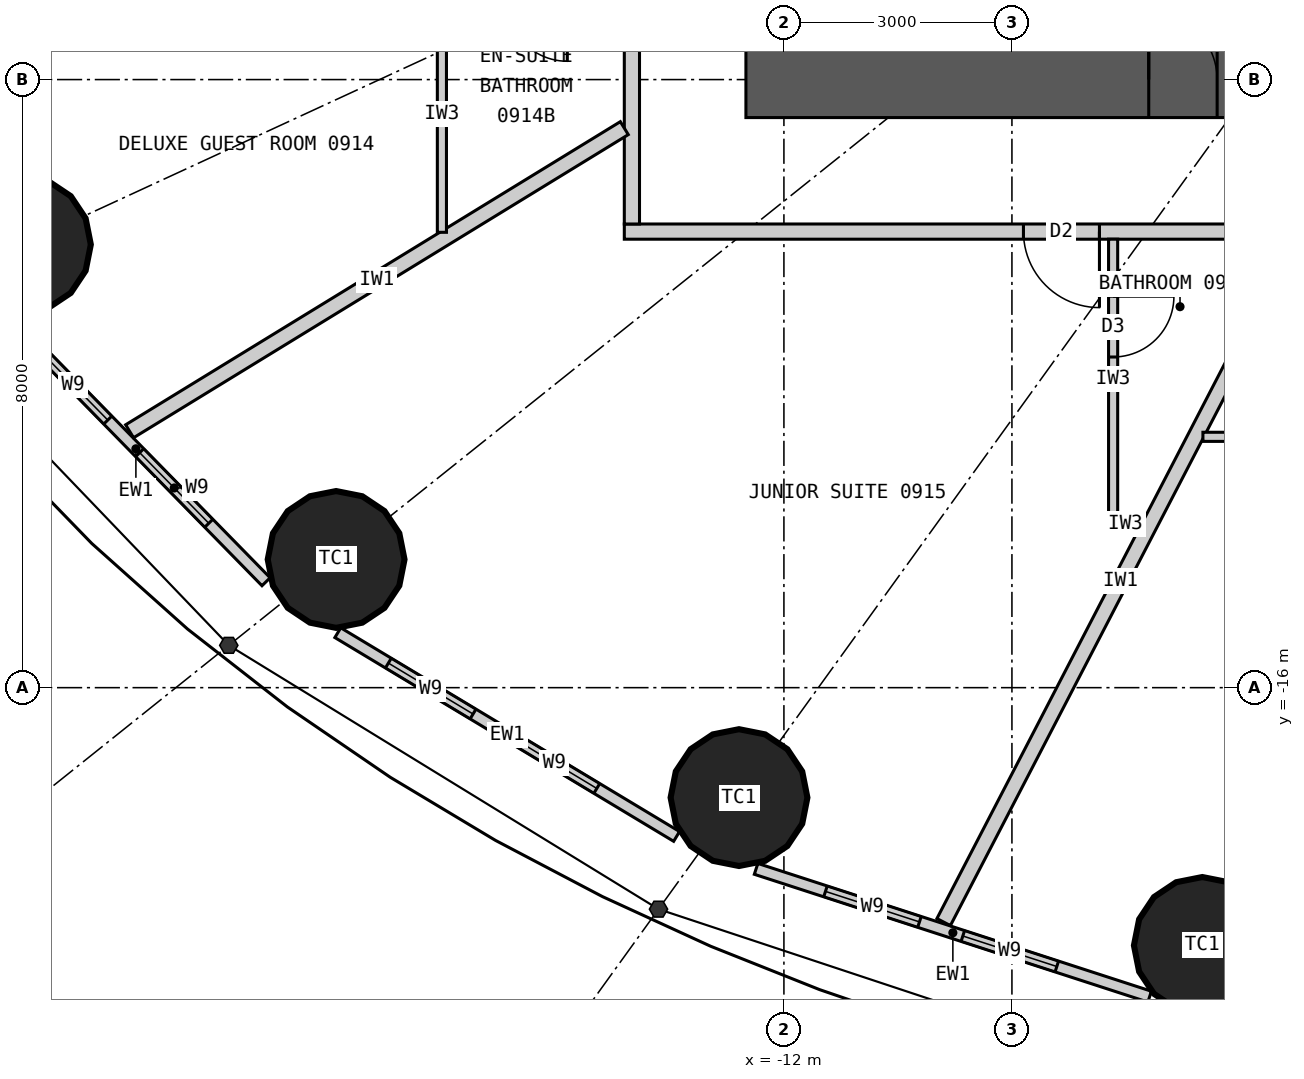
"""IFC4 building model, lengths in metres.
Left out: names, types, materials, properties, quantities, classifications, styles, units other than length and angle.
Written with IfcOpenShell. Run it as: python <this file> out.ifc"""

import sys

from ifc_helpers import new_model, si_unit, direction, frame, frame_2d, origin, origin_2d, place, context, subcontext, project, spatial, rectangle, circle, extrude, element, fill, save


model = new_model("IFC4")
c1 = context("Model", 3, precision=1e-05, world=origin(), true_north=direction((0.0, 1.0)))
c2 = subcontext(c1, "Body", "Model", "MODEL_VIEW")
j1 = project(units=[si_unit("LENGTHUNIT", "METRE"), si_unit("PLANEANGLEUNIT", "RADIAN")], contexts=[c1])
p1 = place(None, origin())
s1 = spatial("IfcSite", under=j1, at=p1, CompositionType="ELEMENT")
p2 = place(p1, origin())
s2 = spatial("IfcBuilding", under=s1, at=p2, CompositionType="ELEMENT")
p3 = place(p2, frame((0.0, 0.0, 42.6)))
s3 = spatial("IfcBuildingStorey", under=s2, at=p3, CompositionType="ELEMENT", Elevation=42.6)
for number, where, z_axis, x_axis in (
    (1, (-22.019, -10.17, 0.0), (0.0, 0.0, 1.0), (1.0, 0.0, 0.0)),
    (2, (-17.892, -14.313, 0.0), (0.0, 0.0, 1.0), (1.0, 0.0, 0.0)),
    (3, (-12.591, -17.447, 0.0), (0.0, 0.0, 1.0), (1.0, 0.0, 0.0)),
    (4, (-6.495, -19.391, 0.0), (0.0, 0.0, 1.0), (1.0, 0.0, 0.0)),
):
    element("IfcColumn", number, at=place(p3, frame(where, z_axis=z_axis, x_axis=x_axis)), inside=s3, PredefinedType="COLUMN", context=c2, shape_type="SweptSolid", body=[
        extrude(circle(Radius=0.9, at=origin_2d()), origin(), (0.0, 0.0, 1.0), 3.3),
    ])
p4 = place(p3, frame((12.5, -8.0, 0.0), z_axis=(0.0, 0.0, 1.0), x_axis=(-1.0, 0.0, 0.0)))
e5 = element("IfcWall", 5, at=p4, inside=s3, PredefinedType="SHEAR", context=c2, shape_type="SweptSolid", body=[
    extrude(rectangle(XDim=25.0, YDim=1.0, at=frame_2d((12.5, 0.0))), origin(), (0.0, 0.0, 1.0), 3.3),
])
p5 = place(p4, frame((11.2, 0.0, 0.0)))
e6 = element("IfcOpeningElement", 6, at=p5, cuts=e5, PredefinedType="OPENING", context=c2, shape_type="SweptSolid", body=[
    extrude(rectangle(XDim=1.2, YDim=2.2, at=frame_2d((0.6, 1.1))), frame((0.0, 0.51, 0.0), z_axis=(0.0, -1.0, 0.0), x_axis=(1.0, 0.0, 0.0)), (0.0, 0.0, 1.0), 1.02),
])
p6 = place(p4, frame((18.8, 0.0, 0.0)))
e7 = element("IfcOpeningElement", 7, at=p6, cuts=e5, PredefinedType="OPENING", context=c2, shape_type="SweptSolid", body=[
    extrude(rectangle(XDim=0.9, YDim=2.2, at=frame_2d((0.45, 1.1))), frame((0.0, 0.51, 0.0), z_axis=(0.0, -1.0, 0.0), x_axis=(1.0, 0.0, 0.0)), (0.0, 0.0, 1.0), 1.02),
])
p7 = place(p3, frame((-22.239, -11.108, 0.0), z_axis=(0.0, 0.0, 1.0), x_axis=(0.699612594083, -0.714522370679, 0.0)))
e8 = element("IfcWall", 8, at=p7, inside=s3, PredefinedType="ELEMENTEDWALL", context=c2, shape_type="SweptSolid", body=[
    extrude(rectangle(XDim=4.896, YDim=0.15, at=frame_2d((2.448, 0.0))), origin(), (0.0, 0.0, 1.0), 3.05),
])
p8 = place(p7, frame((0.619, 0.0, 0.9)))
e9 = element("IfcOpeningElement", 9, at=p8, cuts=e8, PredefinedType="OPENING", context=c2, shape_type="SweptSolid", body=[
    extrude(rectangle(XDim=1.3, YDim=1.9, at=frame_2d((0.65, 0.95))), frame((0.0, 0.085, 0.0), z_axis=(0.0, -1.0, 0.0), x_axis=(1.0, 0.0, 0.0)), (0.0, 0.0, 1.0), 0.17),
])
p9 = place(p7, frame((2.519, 0.0, 0.9)))
e10 = element("IfcOpeningElement", 10, at=p9, cuts=e8, PredefinedType="OPENING", context=c2, shape_type="SweptSolid", body=[
    extrude(rectangle(XDim=1.3, YDim=1.9, at=frame_2d((0.65, 0.95))), frame((0.0, 0.085, 0.0), z_axis=(0.0, -1.0, 0.0), x_axis=(1.0, 0.0, 0.0)), (0.0, 0.0, 1.0), 0.17),
])
p10 = place(p3, frame((-17.869, -15.277, 0.0), z_axis=(0.0, 0.0, 1.0), x_axis=(0.856958191554, -0.515385931054, 0.0)))
e11 = element("IfcWall", 11, at=p10, inside=s3, PredefinedType="ELEMENTEDWALL", context=c2, shape_type="SweptSolid", body=[
    extrude(rectangle(XDim=5.201, YDim=0.15, at=frame_2d((2.601, 0.0))), origin(), (0.0, 0.0, 1.0), 3.05),
])
p11 = place(p10, frame((0.776, 0.0, 0.9)))
e12 = element("IfcOpeningElement", 12, at=p11, cuts=e11, PredefinedType="OPENING", context=c2, shape_type="SweptSolid", body=[
    extrude(rectangle(XDim=1.3, YDim=1.9, at=frame_2d((0.65, 0.95))), frame((0.0, 0.085, 0.0), z_axis=(0.0, -1.0, 0.0), x_axis=(1.0, 0.0, 0.0)), (0.0, 0.0, 1.0), 0.17),
])
p12 = place(p10, frame((2.676, 0.0, 0.9)))
e13 = element("IfcOpeningElement", 13, at=p12, cuts=e11, PredefinedType="OPENING", context=c2, shape_type="SweptSolid", body=[
    extrude(rectangle(XDim=1.3, YDim=1.9, at=frame_2d((0.65, 0.95))), frame((0.0, 0.085, 0.0), z_axis=(0.0, -1.0, 0.0), x_axis=(1.0, 0.0, 0.0)), (0.0, 0.0, 1.0), 0.17),
])
p13 = place(p3, frame((-12.366, -18.384, 0.0), z_axis=(0.0, 0.0, 1.0), x_axis=(0.951138486029, -0.308764603532, 0.0)))
e14 = element("IfcWall", 14, at=p13, inside=s3, PredefinedType="ELEMENTEDWALL", context=c2, shape_type="SweptSolid", body=[
    extrude(rectangle(XDim=5.444, YDim=0.15, at=frame_2d((2.722, 0.0))), origin(), (0.0, 0.0, 1.0), 3.05),
])
p14 = place(p13, frame((0.96, 0.0, 0.9)))
e15 = element("IfcOpeningElement", 15, at=p14, cuts=e14, PredefinedType="OPENING", context=c2, shape_type="SweptSolid", body=[
    extrude(rectangle(XDim=1.3, YDim=1.9, at=frame_2d((0.65, 0.95))), frame((0.0, 0.085, 0.0), z_axis=(0.0, -1.0, 0.0), x_axis=(1.0, 0.0, 0.0)), (0.0, 0.0, 1.0), 0.17),
])
p15 = place(p13, frame((2.86, 0.0, 0.9)))
e16 = element("IfcOpeningElement", 16, at=p15, cuts=e14, PredefinedType="OPENING", context=c2, shape_type="SweptSolid", body=[
    extrude(rectangle(XDim=1.3, YDim=1.9, at=frame_2d((0.65, 0.95))), frame((0.0, 0.085, 0.0), z_axis=(0.0, -1.0, 0.0), x_axis=(1.0, 0.0, 0.0)), (0.0, 0.0, 1.0), 0.17),
])
p16 = place(p3, frame((14.1, -10.0, 0.0), z_axis=(0.0, 0.0, 1.0), x_axis=(-1.0, 0.0, 0.0)))
e17 = element("IfcWall", 17, at=p16, inside=s3, PredefinedType="PARTITIONING", context=c2, shape_type="SweptSolid", body=[
    extrude(rectangle(XDim=28.2, YDim=0.2, at=frame_2d((14.1, 0.0))), origin(), (0.0, 0.0, 1.0), 3.05),
])
p17 = place(p16, frame((21.948, 0.0, 0.0)))
e18 = element("IfcOpeningElement", 18, at=p17, cuts=e17, PredefinedType="OPENING", context=c2, shape_type="SweptSolid", body=[
    extrude(rectangle(XDim=1.0, YDim=2.2, at=frame_2d((0.5, 1.1))), frame((0.0, 0.11, 0.0), z_axis=(0.0, -1.0, 0.0), x_axis=(1.0, 0.0, 0.0)), (0.0, 0.0, 1.0), 0.22),
])
p18 = place(p16, frame((15.684, 0.0, 0.0)))
e19 = element("IfcOpeningElement", 19, at=p18, cuts=e17, PredefinedType="OPENING", context=c2, shape_type="SweptSolid", body=[
    extrude(rectangle(XDim=1.0, YDim=2.2, at=frame_2d((0.5, 1.1))), frame((0.0, 0.11, 0.0), z_axis=(0.0, -1.0, 0.0), x_axis=(1.0, 0.0, 0.0)), (0.0, 0.0, 1.0), 0.22),
])
p19 = place(p16, frame((8.875, 0.0, 0.0)))
e20 = element("IfcOpeningElement", 20, at=p19, cuts=e17, PredefinedType="OPENING", context=c2, shape_type="SweptSolid", body=[
    extrude(rectangle(XDim=1.0, YDim=2.2, at=frame_2d((0.5, 1.1))), frame((0.0, 0.11, 0.0), z_axis=(0.0, -1.0, 0.0), x_axis=(1.0, 0.0, 0.0)), (0.0, 0.0, 1.0), 0.22),
])
p20 = place(p3, frame((-14.0, 9.9, 0.0), z_axis=(0.0, 0.0, 1.0), x_axis=(0.0, -1.0, 0.0)))
e21 = element("IfcWall", 21, at=p20, inside=s3, PredefinedType="PARTITIONING", context=c2, shape_type="SweptSolid", body=[
    extrude(rectangle(XDim=19.8, YDim=0.2, at=frame_2d((9.9, 0.0))), origin(), (0.0, 0.0, 1.0), 3.05),
])
p21 = place(p20, frame((0.103, 0.0, 0.0)))
e22 = element("IfcOpeningElement", 22, at=p21, cuts=e21, PredefinedType="OPENING", context=c2, shape_type="SweptSolid", body=[
    extrude(rectangle(XDim=1.0, YDim=2.2, at=frame_2d((0.5, 1.1))), frame((0.0, 0.11, 0.0), z_axis=(0.0, -1.0, 0.0), x_axis=(1.0, 0.0, 0.0)), (0.0, 0.0, 1.0), 0.22),
])
p22 = place(p20, frame((5.252, 0.0, 0.0)))
e23 = element("IfcOpeningElement", 23, at=p22, cuts=e21, PredefinedType="OPENING", context=c2, shape_type="SweptSolid", body=[
    extrude(rectangle(XDim=1.0, YDim=2.0, at=frame_2d((0.5, 1.0))), frame((0.0, 0.11, 0.0), z_axis=(0.0, -1.0, 0.0), x_axis=(1.0, 0.0, 0.0)), (0.0, 0.0, 1.0), 0.22),
])
p23 = place(p20, frame((10.117, 0.0, 0.0)))
e24 = element("IfcOpeningElement", 24, at=p23, cuts=e21, PredefinedType="OPENING", context=c2, shape_type="SweptSolid", body=[
    extrude(rectangle(XDim=1.0, YDim=2.2, at=frame_2d((0.5, 1.1))), frame((0.0, 0.11, 0.0), z_axis=(0.0, -1.0, 0.0), x_axis=(1.0, 0.0, 0.0)), (0.0, 0.0, 1.0), 0.22),
])
p24 = place(p20, frame((13.247, 0.0, 0.0)))
e25 = element("IfcOpeningElement", 25, at=p24, cuts=e21, PredefinedType="OPENING", context=c2, shape_type="SweptSolid", body=[
    extrude(rectangle(XDim=1.0, YDim=2.0, at=frame_2d((0.5, 1.0))), frame((0.0, 0.11, 0.0), z_axis=(0.0, -1.0, 0.0), x_axis=(1.0, 0.0, 0.0)), (0.0, 0.0, 1.0), 0.22),
])
p25 = place(p20, frame((15.679, 0.0, 0.0)))
e26 = element("IfcOpeningElement", 26, at=p25, cuts=e21, PredefinedType="OPENING", context=c2, shape_type="SweptSolid", body=[
    extrude(rectangle(XDim=1.0, YDim=2.2, at=frame_2d((0.5, 1.1))), frame((0.0, 0.11, 0.0), z_axis=(0.0, -1.0, 0.0), x_axis=(1.0, 0.0, 0.0)), (0.0, 0.0, 1.0), 0.22),
])
p26 = place(p3, frame((-14.1, -4.663, 0.0), z_axis=(0.0, 0.0, 1.0), x_axis=(-0.949432655039, -0.31397075269, 0.0)))
e27 = element("IfcWall", 27, at=p26, inside=s3, PredefinedType="PARTITIONING", context=c2, shape_type="SweptSolid", body=[
    extrude(rectangle(XDim=10.486, YDim=0.2, at=frame_2d((5.243, 0.0))), origin(), (0.0, 0.0, 1.0), 3.05),
])
p27 = place(p3, frame((-14.1, -8.639, 0.0), z_axis=(0.0, 0.0, 1.0), x_axis=(-0.852672493023, -0.522445805459, 0.0)))
e28 = element("IfcWall", 28, at=p27, inside=s3, PredefinedType="PARTITIONING", context=c2, shape_type="SweptSolid", body=[
    extrude(rectangle(XDim=7.633, YDim=0.2, at=frame_2d((3.817, 0.0))), origin(), (0.0, 0.0, 1.0), 3.05),
])
p28 = place(p3, frame((-5.239, -10.1, 0.0), z_axis=(0.0, 0.0, 1.0), x_axis=(-0.460422783389, -0.887699758103, 0.0)))
e29 = element("IfcWall", 29, at=p28, inside=s3, PredefinedType="PARTITIONING", context=c2, shape_type="SweptSolid", body=[
    extrude(rectangle(XDim=10.12, YDim=0.2, at=frame_2d((5.06, 0.0))), origin(), (0.0, 0.0, 1.0), 3.05),
])
p29 = place(p3, frame((-16.5, -10.01, 0.0), z_axis=(0.0, 0.0, 1.0), x_axis=(0.0, 1.0, 0.0)))
e30 = element("IfcWall", 30, at=p29, inside=s3, PredefinedType="PARTITIONING", context=c2, shape_type="SweptSolid", body=[
    extrude(rectangle(XDim=3.111, YDim=0.12, at=frame_2d((1.555, 0.0))), origin(), (0.0, 0.0, 1.0), 3.05),
])
p30 = place(p3, frame((-7.284, -13.85, 0.0), z_axis=(0.0, 0.0, 1.0), x_axis=(-1.0, 0.0, 0.0)))
e31 = element("IfcWall", 31, at=p30, inside=s3, PredefinedType="PARTITIONING", context=c2, shape_type="SweptSolid", body=[
    extrude(rectangle(XDim=0.445, YDim=0.12, at=frame_2d((0.222, 0.0))), origin(), (0.0, 0.0, 1.0), 3.05),
])
p31 = place(p3, frame((-7.669, -10.1, 0.0), z_axis=(0.0, 0.0, 1.0), x_axis=(0.0, -1.0, 0.0)))
e32 = element("IfcWall", 32, at=p31, inside=s3, PredefinedType="PARTITIONING", context=c2, shape_type="SweptSolid", body=[
    extrude(rectangle(XDim=3.69, YDim=0.12, at=frame_2d((1.845, 0.0))), origin(), (0.0, 0.0, 1.0), 3.05),
])
p32 = place(p31, frame((0.75, 0.0, 0.0)))
e33 = element("IfcOpeningElement", 33, at=p32, cuts=e32, PredefinedType="OPENING", context=c2, shape_type="SweptSolid", body=[
    extrude(rectangle(XDim=0.8, YDim=2.1, at=frame_2d((0.4, 1.05))), frame((0.0, 0.07, 0.0), z_axis=(0.0, -1.0, 0.0), x_axis=(1.0, 0.0, 0.0)), (0.0, 0.0, 1.0), 0.14),
])
p33 = place(p3, frame((-6.487, -12.7, 0.0), z_axis=(0.0, 0.0, 1.0), x_axis=(1.0, 0.0, 0.0)))
e34 = element("IfcWall", 34, at=p33, inside=s3, PredefinedType="PARTITIONING", context=c2, shape_type="SweptSolid", body=[
    extrude(rectangle(XDim=3.688, YDim=0.12, at=frame_2d((1.844, 0.0))), origin(), (0.0, 0.0, 1.0), 3.05),
])
p34 = place(p8, origin())
e35 = element("IfcWindow", 35, at=p34, inside=s3, PartitioningType="SINGLE_PANEL", PredefinedType="WINDOW", context=c2, shape_type="SweptSolid", body=[
    extrude(rectangle(XDim=1.3, YDim=1.9, at=frame_2d((0.65, 0.95))), frame((0.0, 0.03, 0.0), z_axis=(0.0, -1.0, 0.0), x_axis=(1.0, 0.0, 0.0)), (0.0, 0.0, 1.0), 0.06),
])
fill(e9, e35)
p35 = place(p9, origin())
e36 = element("IfcWindow", 36, at=p35, inside=s3, PartitioningType="SINGLE_PANEL", PredefinedType="WINDOW", context=c2, shape_type="SweptSolid", body=[
    extrude(rectangle(XDim=1.3, YDim=1.9, at=frame_2d((0.65, 0.95))), frame((0.0, 0.03, 0.0), z_axis=(0.0, -1.0, 0.0), x_axis=(1.0, 0.0, 0.0)), (0.0, 0.0, 1.0), 0.06),
])
fill(e10, e36)
p36 = place(p11, origin())
e37 = element("IfcWindow", 37, at=p36, inside=s3, PartitioningType="SINGLE_PANEL", PredefinedType="WINDOW", context=c2, shape_type="SweptSolid", body=[
    extrude(rectangle(XDim=1.3, YDim=1.9, at=frame_2d((0.65, 0.95))), frame((0.0, 0.03, 0.0), z_axis=(0.0, -1.0, 0.0), x_axis=(1.0, 0.0, 0.0)), (0.0, 0.0, 1.0), 0.06),
])
fill(e12, e37)
p37 = place(p12, origin())
e38 = element("IfcWindow", 38, at=p37, inside=s3, PartitioningType="SINGLE_PANEL", PredefinedType="WINDOW", context=c2, shape_type="SweptSolid", body=[
    extrude(rectangle(XDim=1.3, YDim=1.9, at=frame_2d((0.65, 0.95))), frame((0.0, 0.03, 0.0), z_axis=(0.0, -1.0, 0.0), x_axis=(1.0, 0.0, 0.0)), (0.0, 0.0, 1.0), 0.06),
])
fill(e13, e38)
p38 = place(p14, origin())
e39 = element("IfcWindow", 39, at=p38, inside=s3, PartitioningType="SINGLE_PANEL", PredefinedType="WINDOW", context=c2, shape_type="SweptSolid", body=[
    extrude(rectangle(XDim=1.3, YDim=1.9, at=frame_2d((0.65, 0.95))), frame((0.0, 0.03, 0.0), z_axis=(0.0, -1.0, 0.0), x_axis=(1.0, 0.0, 0.0)), (0.0, 0.0, 1.0), 0.06),
])
fill(e15, e39)
p39 = place(p15, origin())
e40 = element("IfcWindow", 40, at=p39, inside=s3, PartitioningType="SINGLE_PANEL", PredefinedType="WINDOW", context=c2, shape_type="SweptSolid", body=[
    extrude(rectangle(XDim=1.3, YDim=1.9, at=frame_2d((0.65, 0.95))), frame((0.0, 0.03, 0.0), z_axis=(0.0, -1.0, 0.0), x_axis=(1.0, 0.0, 0.0)), (0.0, 0.0, 1.0), 0.06),
])
fill(e16, e40)
p40 = place(p32, origin())
e41 = element("IfcDoor", 41, at=p40, inside=s3, OperationType="SINGLE_SWING_LEFT", PredefinedType="DOOR", context=c2, shape_type="SweptSolid", body=[
    extrude(rectangle(XDim=0.8, YDim=2.1, at=frame_2d((0.4, 1.05))), frame((0.0, 0.025, 0.0), z_axis=(0.0, -1.0, 0.0), x_axis=(1.0, 0.0, 0.0)), (0.0, 0.0, 1.0), 0.05),
])
fill(e33, e41)
p41 = place(p17, origin())
e42 = element("IfcDoor", 42, at=p41, inside=s3, OperationType="SINGLE_SWING_LEFT", PredefinedType="DOOR", context=c2, shape_type="SweptSolid", body=[
    extrude(rectangle(XDim=1.0, YDim=2.2, at=frame_2d((0.5, 1.1))), frame((0.0, 0.025, 0.0), z_axis=(0.0, -1.0, 0.0), x_axis=(1.0, 0.0, 0.0)), (0.0, 0.0, 1.0), 0.05),
])
fill(e18, e42)
p42 = place(p6, origin())
e43 = element("IfcDoor", 43, at=p42, inside=s3, OperationType="SINGLE_SWING_RIGHT", PredefinedType="DOOR", context=c2, shape_type="SweptSolid", body=[
    extrude(rectangle(XDim=0.9, YDim=2.2, at=frame_2d((0.45, 1.1))), frame((0.0, 0.025, 0.0), z_axis=(0.0, -1.0, 0.0), x_axis=(1.0, 0.0, 0.0)), (0.0, 0.0, 1.0), 0.05),
])
fill(e7, e43)
save(model, sys.argv[1])
